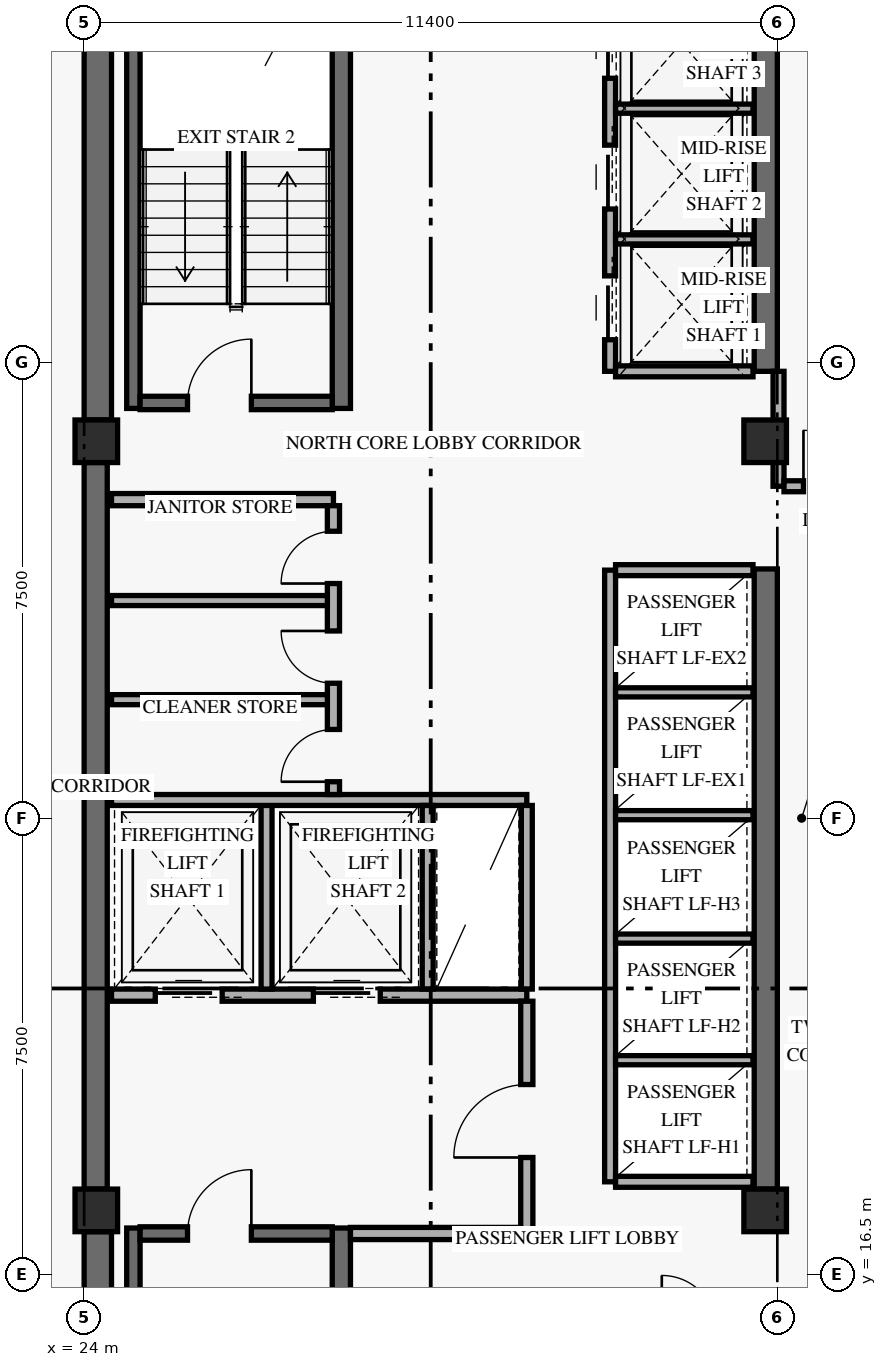
"""IFC4 building model, lengths in metres.
Left out: names, types, materials, properties, quantities, classifications, styles, units other than length and angle.
Written with IfcOpenShell. Run it as: python <this file> out.ifc"""

import sys

from ifc_helpers import new_model, si_unit, direction, frame, frame_2d, origin, origin_2d, place, context, subcontext, project, spatial, rectangle, extrude, element, fill, save


model = new_model("IFC4")
c1 = context("Model", 3, precision=1e-05, world=origin(), true_north=direction((0.0, 1.0)))
c2 = subcontext(c1, "Body", "Model", "MODEL_VIEW")
j1 = project(units=[si_unit("LENGTHUNIT", "METRE"), si_unit("PLANEANGLEUNIT", "RADIAN")], contexts=[c1])
p1 = place(None, origin())
s1 = spatial("IfcSite", under=j1, at=p1, CompositionType="ELEMENT")
p2 = place(p1, origin())
s2 = spatial("IfcBuilding", under=s1, at=p2, CompositionType="ELEMENT")
p3 = place(p2, frame((0.0, 0.0, 151.8)))
s3 = spatial("IfcBuildingStorey", under=s2, at=p3, CompositionType="ELEMENT", Elevation=151.8)
p4 = place(p3, frame((24.225, 9.6, 0.0), z_axis=(0.0, 0.0, 1.0), x_axis=(0.0, 1.0, 0.0)))
e1 = element("IfcWall", 1, at=p4, inside=s3, PredefinedType="SHEAR", context=c2, shape_type="SweptSolid", body=[
    extrude(rectangle(XDim=7.6, YDim=0.45, at=frame_2d((3.8, 0.0))), origin(), (0.0, 0.0, 1.0), 2.748),
])
p5 = place(p3, frame((24.19, 17.9, 0.0), z_axis=(0.0, 0.0, 1.0), x_axis=(0.0, 1.0, 0.0)))
e2 = element("IfcWall", 2, at=p5, inside=s3, PredefinedType="SHEAR", context=c2, shape_type="SweptSolid", body=[
    extrude(rectangle(XDim=11.95, YDim=0.38, at=frame_2d((5.975, 0.0))), origin(), (0.0, 0.0, 1.0), 2.748),
])
p6 = place(p3, frame((24.225, 30.55, 0.0), z_axis=(0.0, 0.0, 1.0), x_axis=(0.0, 1.0, 0.0)))
e3 = element("IfcWall", 3, at=p6, inside=s3, PredefinedType="SHEAR", context=c2, shape_type="SweptSolid", body=[
    extrude(rectangle(XDim=7.85, YDim=0.45, at=frame_2d((3.925, 0.0))), origin(), (0.0, 0.0, 1.0), 2.748),
])
p7 = place(p3, frame((35.21, 17.9, 0.0), z_axis=(0.0, 0.0, 1.0), x_axis=(0.0, 1.0, 0.0)))
e4 = element("IfcWall", 4, at=p7, inside=s3, PredefinedType="SHEAR", context=c2, shape_type="SweptSolid", body=[
    extrude(rectangle(XDim=10.2, YDim=0.38, at=frame_2d((5.1, 0.0))), origin(), (0.0, 0.0, 1.0), 2.748),
])
p8 = place(p3, frame((35.21, 31.35, 0.0), z_axis=(0.0, 0.0, 1.0), x_axis=(0.0, 1.0, 0.0)))
e5 = element("IfcWall", 5, at=p8, inside=s3, PredefinedType="SHEAR", context=c2, shape_type="SweptSolid", body=[
    extrude(rectangle(XDim=7.05, YDim=0.38, at=frame_2d((3.525, 0.0))), origin(), (0.0, 0.0, 1.0), 2.748),
])
p9 = place(p3, frame((24.81, 9.5, 0.0), z_axis=(0.0, 0.0, 1.0), x_axis=(0.0, 1.0, 0.0)))
e6 = element("IfcWall", 6, at=p9, inside=s3, PredefinedType="SHEAR", context=c2, shape_type="SweptSolid", body=[
    extrude(rectangle(XDim=7.76, YDim=0.22, at=frame_2d((3.88, 0.0))), origin(), (0.0, 0.0, 1.0), 3.36),
])
p10 = place(p3, frame((28.23, 9.5, 0.0), z_axis=(0.0, 0.0, 1.0), x_axis=(0.0, 1.0, 0.0)))
e7 = element("IfcWall", 7, at=p10, inside=s3, PredefinedType="SHEAR", context=c2, shape_type="SweptSolid", body=[
    extrude(rectangle(XDim=7.76, YDim=0.3, at=frame_2d((3.88, 0.0))), origin(), (0.0, 0.0, 1.0), 3.36),
])
p11 = place(p3, frame((24.92, 17.17, 0.0), z_axis=(0.0, 0.0, 1.0), x_axis=(1.0, 0.0, 0.0)))
e8 = element("IfcWall", 8, at=p11, inside=s3, PredefinedType="SHEAR", context=c2, shape_type="SweptSolid", body=[
    extrude(rectangle(XDim=3.16, YDim=0.22, at=frame_2d((1.58, 0.0))), origin(), (0.0, 0.0, 1.0), 3.36),
])
p12 = place(p11, frame((0.78, 0.0, 0.0)))
e9 = element("IfcOpeningElement", 9, at=p12, cuts=e8, PredefinedType="OPENING", context=c2, shape_type="SweptSolid", body=[
    extrude(rectangle(XDim=1.05, YDim=2.15, at=frame_2d((0.525, 1.075))), frame((0.0, 0.12, 0.0), z_axis=(0.0, -1.0, 0.0), x_axis=(1.0, 0.0, 0.0)), (0.0, 0.0, 1.0), 0.24),
])
p13 = place(p3, frame((24.81, 30.74, 0.0), z_axis=(0.0, 0.0, 1.0), x_axis=(0.0, 1.0, 0.0)))
e10 = element("IfcWall", 10, at=p13, inside=s3, PredefinedType="SHEAR", context=c2, shape_type="SweptSolid", body=[
    extrude(rectangle(XDim=7.76, YDim=0.22, at=frame_2d((3.88, 0.0))), origin(), (0.0, 0.0, 1.0), 3.36),
])
p14 = place(p3, frame((28.23, 30.74, 0.0), z_axis=(0.0, 0.0, 1.0), x_axis=(0.0, 1.0, 0.0)))
e11 = element("IfcWall", 11, at=p14, inside=s3, PredefinedType="SHEAR", context=c2, shape_type="SweptSolid", body=[
    extrude(rectangle(XDim=7.76, YDim=0.3, at=frame_2d((3.88, 0.0))), origin(), (0.0, 0.0, 1.0), 3.36),
])
p15 = place(p3, frame((24.92, 30.83, 0.0), z_axis=(0.0, 0.0, 1.0), x_axis=(1.0, 0.0, 0.0)))
e12 = element("IfcWall", 12, at=p15, inside=s3, PredefinedType="SHEAR", context=c2, shape_type="SweptSolid", body=[
    extrude(rectangle(XDim=3.16, YDim=0.22, at=frame_2d((1.58, 0.0))), origin(), (0.0, 0.0, 1.0), 3.36),
])
p16 = place(p15, frame((0.78, 0.0, 0.0)))
e13 = element("IfcOpeningElement", 13, at=p16, cuts=e12, PredefinedType="OPENING", context=c2, shape_type="SweptSolid", body=[
    extrude(rectangle(XDim=1.05, YDim=2.15, at=frame_2d((0.525, 1.075))), frame((0.0, 0.12, 0.0), z_axis=(0.0, -1.0, 0.0), x_axis=(1.0, 0.0, 0.0)), (0.0, 0.0, 1.0), 0.24),
])
for number, where, z_axis, x_axis in (
    (14, (24.2, 17.55, 0.0), (0.0, 0.0, 1.0), (1.0, 0.0, 0.0)),
    (15, (24.2, 30.2, 0.0), (0.0, 0.0, 1.0), (1.0, 0.0, 0.0)),
    (16, (35.2, 17.55, 0.0), (0.0, 0.0, 1.0), (1.0, 0.0, 0.0)),
    (17, (35.2, 30.2, 0.0), (0.0, 0.0, 1.0), (1.0, 0.0, 0.0)),
):
    element("IfcColumn", number, at=place(p3, frame(where, z_axis=z_axis, x_axis=x_axis)), inside=s3, PredefinedType="COLUMN", context=c2, shape_type="SweptSolid", body=[
        extrude(rectangle(XDim=0.7, YDim=0.7, at=origin_2d()), origin(), (0.0, 0.0, 1.0), 3.6),
    ])
p17 = place(p3, frame((24.45, 21.09, 0.0), z_axis=(0.0, 0.0, 1.0), x_axis=(1.0, 0.0, 0.0)))
e18 = element("IfcWall", 18, at=p17, inside=s3, PredefinedType="STANDARD", context=c2, shape_type="SweptSolid", body=[
    extrude(rectangle(XDim=6.83, YDim=0.2, at=frame_2d((3.415, 0.0))), origin(), (0.0, 0.0, 1.0), 3.36),
])
p18 = place(p17, frame((0.72, 0.0, 0.0)))
e19 = element("IfcOpeningElement", 19, at=p18, cuts=e18, PredefinedType="OPENING", context=c2, shape_type="SweptSolid", body=[
    extrude(rectangle(XDim=1.1, YDim=2.2, at=frame_2d((0.55, 1.1))), frame((0.0, 0.11, 0.0), z_axis=(0.0, -1.0, 0.0), x_axis=(1.0, 0.0, 0.0)), (0.0, 0.0, 1.0), 0.22),
])
p19 = place(p17, frame((3.32, 0.0, 0.0)))
e20 = element("IfcOpeningElement", 20, at=p19, cuts=e18, PredefinedType="OPENING", context=c2, shape_type="SweptSolid", body=[
    extrude(rectangle(XDim=1.1, YDim=2.2, at=frame_2d((0.55, 1.1))), frame((0.0, 0.11, 0.0), z_axis=(0.0, -1.0, 0.0), x_axis=(1.0, 0.0, 0.0)), (0.0, 0.0, 1.0), 0.22),
])
p20 = place(p3, frame((28.38, 17.17, 0.0), z_axis=(0.0, 0.0, 1.0), x_axis=(1.0, 0.0, 0.0)))
e21 = element("IfcWall", 21, at=p20, inside=s3, PredefinedType="STANDARD", context=c2, shape_type="SweptSolid", body=[
    extrude(rectangle(XDim=2.9, YDim=0.2, at=frame_2d((1.45, 0.0))), origin(), (0.0, 0.0, 1.0), 3.36),
])
p21 = place(p3, frame((31.28, 17.07, 0.0), z_axis=(0.0, 0.0, 1.0), x_axis=(0.0, 1.0, 0.0)))
e22 = element("IfcWall", 22, at=p21, inside=s3, PredefinedType="STANDARD", context=c2, shape_type="SweptSolid", body=[
    extrude(rectangle(XDim=3.92, YDim=0.2, at=frame_2d((1.96, 0.0))), origin(), (0.0, 0.0, 1.0), 2.73),
])
p22 = place(p21, frame((1.35, 0.0, 0.0)))
e23 = element("IfcOpeningElement", 23, at=p22, cuts=e22, PredefinedType="OPENING", context=c2, shape_type="SweptSolid", body=[
    extrude(rectangle(XDim=1.2, YDim=2.15, at=frame_2d((0.6, 1.075))), frame((0.0, 0.11, 0.0), z_axis=(0.0, -1.0, 0.0), x_axis=(1.0, 0.0, 0.0)), (0.0, 0.0, 1.0), 0.22),
])
p23 = place(p3, frame((27.0, 21.19, 0.0), z_axis=(0.0, 0.0, 1.0), x_axis=(0.0, 1.0, 0.0)))
e24 = element("IfcWall", 24, at=p23, inside=s3, PredefinedType="STANDARD", context=c2, shape_type="SweptSolid", body=[
    extrude(rectangle(XDim=3.11, YDim=0.18, at=frame_2d((1.555, 0.0))), origin(), (0.0, 0.0, 1.0), 3.36),
])
p24 = place(p3, frame((24.45, 24.3, 0.0), z_axis=(0.0, 0.0, 1.0), x_axis=(1.0, 0.0, 0.0)))
e25 = element("IfcWall", 25, at=p24, inside=s3, PredefinedType="STANDARD", context=c2, shape_type="SweptSolid", body=[
    extrude(rectangle(XDim=6.83, YDim=0.18, at=frame_2d((3.415, 0.0))), origin(), (0.0, 0.0, 1.0), 3.36),
])
for number, where, z_axis, x_axis in (
    (26, (29.65, 21.19, 0.0), (0.0, 0.0, 1.0), (0.0, 1.0, 0.0)),
    (27, (31.28, 21.19, 0.0), (0.0, 0.0, 1.0), (0.0, 1.0, 0.0)),
):
    element("IfcWall", number, at=place(p3, frame(where, z_axis=z_axis, x_axis=x_axis)), inside=s3, PredefinedType="STANDARD", context=c2, shape_type="SweptSolid", body=[
        extrude(rectangle(XDim=3.02, YDim=0.18, at=frame_2d((1.51, 0.0))), origin(), (0.0, 0.0, 1.0), 3.36),
    ])
p25 = place(p3, frame((24.45, 29.24, 0.0), z_axis=(0.0, 0.0, 1.0), x_axis=(1.0, 0.0, 0.0)))
e28 = element("IfcWall", 28, at=p25, inside=s3, PredefinedType="STANDARD", context=c2, shape_type="SweptSolid", body=[
    extrude(rectangle(XDim=3.65, YDim=0.2, at=frame_2d((1.825, 0.0))), origin(), (0.0, 0.0, 1.0), 3.36),
])
p26 = place(p3, frame((28.1, 24.39, 0.0), z_axis=(0.0, 0.0, 1.0), x_axis=(0.0, 1.0, 0.0)))
e29 = element("IfcWall", 29, at=p26, inside=s3, PredefinedType="STANDARD", context=c2, shape_type="SweptSolid", body=[
    extrude(rectangle(XDim=4.75, YDim=0.2, at=frame_2d((2.375, 0.0))), origin(), (0.0, 0.0, 1.0), 3.36),
])
p27 = place(p26, frame((0.21, 0.0, 0.0)))
e30 = element("IfcOpeningElement", 30, at=p27, cuts=e29, PredefinedType="OPENING", context=c2, shape_type="SweptSolid", body=[
    extrude(rectangle(XDim=0.86, YDim=2.1, at=frame_2d((0.43, 1.05))), frame((0.0, 0.11, 0.0), z_axis=(0.0, -1.0, 0.0), x_axis=(1.0, 0.0, 0.0)), (0.0, 0.0, 1.0), 0.22),
])
p28 = place(p26, frame((1.83, 0.0, 0.0)))
e31 = element("IfcOpeningElement", 31, at=p28, cuts=e29, PredefinedType="OPENING", context=c2, shape_type="SweptSolid", body=[
    extrude(rectangle(XDim=0.86, YDim=2.1, at=frame_2d((0.43, 1.05))), frame((0.0, 0.11, 0.0), z_axis=(0.0, -1.0, 0.0), x_axis=(1.0, 0.0, 0.0)), (0.0, 0.0, 1.0), 0.22),
])
p29 = place(p26, frame((3.47, 0.0, 0.0)))
e32 = element("IfcOpeningElement", 32, at=p29, cuts=e29, PredefinedType="OPENING", context=c2, shape_type="SweptSolid", body=[
    extrude(rectangle(XDim=0.86, YDim=2.1, at=frame_2d((0.43, 1.05))), frame((0.0, 0.11, 0.0), z_axis=(0.0, -1.0, 0.0), x_axis=(1.0, 0.0, 0.0)), (0.0, 0.0, 1.0), 0.22),
])
for number, where, z_axis, x_axis in (
    (33, (24.45, 25.95, 0.0), (0.0, 0.0, 1.0), (1.0, 0.0, 0.0)),
    (34, (24.45, 27.58, 0.0), (0.0, 0.0, 1.0), (1.0, 0.0, 0.0)),
):
    element("IfcWall", number, at=place(p3, frame(where, z_axis=z_axis, x_axis=x_axis)), inside=s3, PredefinedType="PARTITIONING", context=c2, shape_type="SweptSolid", body=[
        extrude(rectangle(XDim=3.55, YDim=0.165, at=frame_2d((1.775, 0.0))), origin(), (0.0, 0.0, 1.0), 3.36),
    ])
p30 = place(p3, frame((32.65, 18.02, 0.0), z_axis=(0.0, 0.0, 1.0), x_axis=(0.0, 1.0, 0.0)))
e35 = element("IfcWall", 35, at=p30, inside=s3, PredefinedType="STANDARD", context=c2, shape_type="SweptSolid", body=[
    extrude(rectangle(XDim=10.06, YDim=0.18, at=frame_2d((5.03, 0.0))), origin(), (0.0, 0.0, 1.0), 3.36),
])
for number, where, z_axis, x_axis in (
    (36, (32.74, 18.02, 0.0), (0.0, 0.0, 1.0), (1.0, 0.0, 0.0)),
    (37, (32.74, 28.08, 0.0), (0.0, 0.0, 1.0), (1.0, 0.0, 0.0)),
):
    element("IfcWall", number, at=place(p3, frame(where, z_axis=z_axis, x_axis=x_axis)), inside=s3, PredefinedType="STANDARD", context=c2, shape_type="SweptSolid", body=[
        extrude(rectangle(XDim=2.26, YDim=0.18, at=frame_2d((1.13, 0.0))), origin(), (0.0, 0.0, 1.0), 3.36),
    ])
for number, where, z_axis, x_axis in (
    (38, (32.74, 20.02, 0.0), (0.0, 0.0, 1.0), (1.0, 0.0, 0.0)),
    (39, (32.74, 22.02, 0.0), (0.0, 0.0, 1.0), (1.0, 0.0, 0.0)),
    (40, (32.74, 24.05, 0.0), (0.0, 0.0, 1.0), (1.0, 0.0, 0.0)),
    (41, (32.74, 26.07, 0.0), (0.0, 0.0, 1.0), (1.0, 0.0, 0.0)),
):
    element("IfcWall", number, at=place(p3, frame(where, z_axis=z_axis, x_axis=x_axis)), inside=s3, PredefinedType="STANDARD", context=c2, shape_type="SweptSolid", body=[
        extrude(rectangle(XDim=2.26, YDim=0.15, at=frame_2d((1.13, 0.0))), origin(), (0.0, 0.0, 1.0), 3.36),
    ])
p31 = place(p3, frame((32.65, 31.35, 0.0), z_axis=(0.0, 0.0, 1.0), x_axis=(0.0, 1.0, 0.0)))
e42 = element("IfcWall", 42, at=p31, inside=s3, PredefinedType="STANDARD", context=c2, shape_type="SweptSolid", body=[
    extrude(rectangle(XDim=7.21, YDim=0.18, at=frame_2d((3.605, 0.0))), origin(), (0.0, 0.0, 1.0), 3.36),
])
p32 = place(p31, frame((0.52, 0.0, 0.0)))
e43 = element("IfcOpeningElement", 43, at=p32, cuts=e42, PredefinedType="OPENING", context=c2, shape_type="SweptSolid", body=[
    extrude(rectangle(XDim=1.05, YDim=2.2, at=frame_2d((0.525, 1.1))), frame((0.0, 0.1, 0.0), z_axis=(0.0, -1.0, 0.0), x_axis=(1.0, 0.0, 0.0)), (0.0, 0.0, 1.0), 0.2),
])
p33 = place(p31, frame((2.67, 0.0, 0.0)))
e44 = element("IfcOpeningElement", 44, at=p33, cuts=e42, PredefinedType="OPENING", context=c2, shape_type="SweptSolid", body=[
    extrude(rectangle(XDim=1.05, YDim=2.2, at=frame_2d((0.525, 1.1))), frame((0.0, 0.1, 0.0), z_axis=(0.0, -1.0, 0.0), x_axis=(1.0, 0.0, 0.0)), (0.0, 0.0, 1.0), 0.2),
])
p34 = place(p31, frame((4.82, 0.0, 0.0)))
e45 = element("IfcOpeningElement", 45, at=p34, cuts=e42, PredefinedType="OPENING", context=c2, shape_type="SweptSolid", body=[
    extrude(rectangle(XDim=1.05, YDim=2.2, at=frame_2d((0.525, 1.1))), frame((0.0, 0.1, 0.0), z_axis=(0.0, -1.0, 0.0), x_axis=(1.0, 0.0, 0.0)), (0.0, 0.0, 1.0), 0.2),
])
p35 = place(p3, frame((32.74, 31.35, 0.0), z_axis=(0.0, 0.0, 1.0), x_axis=(1.0, 0.0, 0.0)))
e46 = element("IfcWall", 46, at=p35, inside=s3, PredefinedType="STANDARD", context=c2, shape_type="SweptSolid", body=[
    extrude(rectangle(XDim=2.26, YDim=0.18, at=frame_2d((1.13, 0.0))), origin(), (0.0, 0.0, 1.0), 3.36),
])
for number, where, z_axis, x_axis in (
    (47, (32.74, 33.52, 0.0), (0.0, 0.0, 1.0), (1.0, 0.0, 0.0)),
    (48, (32.74, 35.67, 0.0), (0.0, 0.0, 1.0), (1.0, 0.0, 0.0)),
):
    element("IfcWall", number, at=place(p3, frame(where, z_axis=z_axis, x_axis=x_axis)), inside=s3, PredefinedType="STANDARD", context=c2, shape_type="SweptSolid", body=[
        extrude(rectangle(XDim=2.26, YDim=0.15, at=frame_2d((1.13, 0.0))), origin(), (0.0, 0.0, 1.0), 3.36),
    ])
p36 = place(p3, frame((35.42, 29.46, 0.0), z_axis=(0.0, 0.0, 1.0), x_axis=(0.0, 1.0, 0.0)))
e49 = element("IfcWall", 49, at=p36, inside=s3, PredefinedType="STANDARD", context=c2, shape_type="SweptSolid", body=[
    extrude(rectangle(XDim=1.89, YDim=0.18, at=frame_2d((0.945, 0.0))), origin(), (0.0, 0.0, 1.0), 2.73),
])
p37 = place(p3, frame((35.51, 29.46, 0.0), z_axis=(0.0, 0.0, 1.0), x_axis=(1.0, 0.0, 0.0)))
e50 = element("IfcWall", 50, at=p37, inside=s3, PredefinedType="STANDARD", context=c2, shape_type="SweptSolid", body=[
    extrude(rectangle(XDim=12.49, YDim=0.18, at=frame_2d((6.245, 0.0))), origin(), (0.0, 0.0, 1.0), 2.73),
])
p38 = place(p37, frame((0.32, 0.0, 0.0)))
e51 = element("IfcOpeningElement", 51, at=p38, cuts=e50, PredefinedType="OPENING", context=c2, shape_type="SweptSolid", body=[
    extrude(rectangle(XDim=0.92, YDim=2.15, at=frame_2d((0.46, 1.075))), frame((0.0, 0.1, 0.0), z_axis=(0.0, -1.0, 0.0), x_axis=(1.0, 0.0, 0.0)), (0.0, 0.0, 1.0), 0.2),
])
p39 = place(p12, frame((1.05, 0.0, 0.0), z_axis=(0.0, 0.0, 1.0), x_axis=(-1.0, 0.0, 0.0)))
e52 = element("IfcDoor", 52, at=p39, inside=s3, OperationType="SINGLE_SWING_LEFT", PredefinedType="DOOR", context=c2, shape_type="SweptSolid", body=[
    extrude(rectangle(XDim=1.05, YDim=2.15, at=frame_2d((0.525, 1.075))), frame((0.0, 0.025, 0.0), z_axis=(0.0, -1.0, 0.0), x_axis=(1.0, 0.0, 0.0)), (0.0, 0.0, 1.0), 0.05),
])
fill(e9, e52)
p40 = place(p16, origin())
e53 = element("IfcDoor", 53, at=p40, inside=s3, OperationType="SINGLE_SWING_RIGHT", PredefinedType="DOOR", context=c2, shape_type="SweptSolid", body=[
    extrude(rectangle(XDim=1.05, YDim=2.15, at=frame_2d((0.525, 1.075))), frame((0.0, 0.025, 0.0), z_axis=(0.0, -1.0, 0.0), x_axis=(1.0, 0.0, 0.0)), (0.0, 0.0, 1.0), 0.05),
])
fill(e13, e53)
p41 = place(p18, origin())
e54 = element("IfcDoor", 54, at=p41, inside=s3, OperationType="SLIDING_TO_LEFT", PredefinedType="DOOR", context=c2, shape_type="SweptSolid", body=[
    extrude(rectangle(XDim=1.1, YDim=2.2, at=frame_2d((0.55, 1.1))), frame((0.0, 0.025, 0.0), z_axis=(0.0, -1.0, 0.0), x_axis=(1.0, 0.0, 0.0)), (0.0, 0.0, 1.0), 0.05),
])
fill(e19, e54)
p42 = place(p19, origin())
e55 = element("IfcDoor", 55, at=p42, inside=s3, OperationType="SLIDING_TO_LEFT", PredefinedType="DOOR", context=c2, shape_type="SweptSolid", body=[
    extrude(rectangle(XDim=1.1, YDim=2.2, at=frame_2d((0.55, 1.1))), frame((0.0, 0.025, 0.0), z_axis=(0.0, -1.0, 0.0), x_axis=(1.0, 0.0, 0.0)), (0.0, 0.0, 1.0), 0.05),
])
fill(e20, e55)
p43 = place(p22, origin())
e56 = element("IfcDoor", 56, at=p43, inside=s3, OperationType="SINGLE_SWING_LEFT", PredefinedType="DOOR", context=c2, shape_type="SweptSolid", body=[
    extrude(rectangle(XDim=1.2, YDim=2.15, at=frame_2d((0.6, 1.075))), frame((0.0, 0.025, 0.0), z_axis=(0.0, -1.0, 0.0), x_axis=(1.0, 0.0, 0.0)), (0.0, 0.0, 1.0), 0.05),
])
fill(e23, e56)
p44 = place(p27, origin())
e57 = element("IfcDoor", 57, at=p44, inside=s3, OperationType="SINGLE_SWING_LEFT", PredefinedType="DOOR", context=c2, shape_type="SweptSolid", body=[
    extrude(rectangle(XDim=0.86, YDim=2.1, at=frame_2d((0.43, 1.05))), frame((0.0, 0.025, 0.0), z_axis=(0.0, -1.0, 0.0), x_axis=(1.0, 0.0, 0.0)), (0.0, 0.0, 1.0), 0.05),
])
fill(e30, e57)
p45 = place(p28, origin())
e58 = element("IfcDoor", 58, at=p45, inside=s3, OperationType="SINGLE_SWING_RIGHT", PredefinedType="DOOR", context=c2, shape_type="SweptSolid", body=[
    extrude(rectangle(XDim=0.86, YDim=2.1, at=frame_2d((0.43, 1.05))), frame((0.0, 0.025, 0.0), z_axis=(0.0, -1.0, 0.0), x_axis=(1.0, 0.0, 0.0)), (0.0, 0.0, 1.0), 0.05),
])
fill(e31, e58)
p46 = place(p29, origin())
e59 = element("IfcDoor", 59, at=p46, inside=s3, OperationType="SINGLE_SWING_LEFT", PredefinedType="DOOR", context=c2, shape_type="SweptSolid", body=[
    extrude(rectangle(XDim=0.86, YDim=2.1, at=frame_2d((0.43, 1.05))), frame((0.0, 0.025, 0.0), z_axis=(0.0, -1.0, 0.0), x_axis=(1.0, 0.0, 0.0)), (0.0, 0.0, 1.0), 0.05),
])
fill(e32, e59)
p47 = place(p32, origin())
e60 = element("IfcDoor", 60, at=p47, inside=s3, OperationType="SLIDING_TO_LEFT", PredefinedType="DOOR", context=c2, shape_type="SweptSolid", body=[
    extrude(rectangle(XDim=1.05, YDim=2.2, at=frame_2d((0.525, 1.1))), frame((0.0, 0.025, 0.0), z_axis=(0.0, -1.0, 0.0), x_axis=(1.0, 0.0, 0.0)), (0.0, 0.0, 1.0), 0.05),
])
fill(e43, e60)
p48 = place(p33, origin())
e61 = element("IfcDoor", 61, at=p48, inside=s3, OperationType="SLIDING_TO_LEFT", PredefinedType="DOOR", context=c2, shape_type="SweptSolid", body=[
    extrude(rectangle(XDim=1.05, YDim=2.2, at=frame_2d((0.525, 1.1))), frame((0.0, 0.025, 0.0), z_axis=(0.0, -1.0, 0.0), x_axis=(1.0, 0.0, 0.0)), (0.0, 0.0, 1.0), 0.05),
])
fill(e44, e61)
p49 = place(p34, origin())
e62 = element("IfcDoor", 62, at=p49, inside=s3, OperationType="SLIDING_TO_LEFT", PredefinedType="DOOR", context=c2, shape_type="SweptSolid", body=[
    extrude(rectangle(XDim=1.05, YDim=2.2, at=frame_2d((0.525, 1.1))), frame((0.0, 0.025, 0.0), z_axis=(0.0, -1.0, 0.0), x_axis=(1.0, 0.0, 0.0)), (0.0, 0.0, 1.0), 0.05),
])
fill(e45, e62)
p50 = place(p38, origin())
e63 = element("IfcDoor", 63, at=p50, inside=s3, OperationType="SINGLE_SWING_LEFT", PredefinedType="DOOR", context=c2, shape_type="SweptSolid", body=[
    extrude(rectangle(XDim=0.92, YDim=2.15, at=frame_2d((0.46, 1.075))), frame((0.0, 0.025, 0.0), z_axis=(0.0, -1.0, 0.0), x_axis=(1.0, 0.0, 0.0)), (0.0, 0.0, 1.0), 0.05),
])
fill(e51, e63)
save(model, sys.argv[1])
